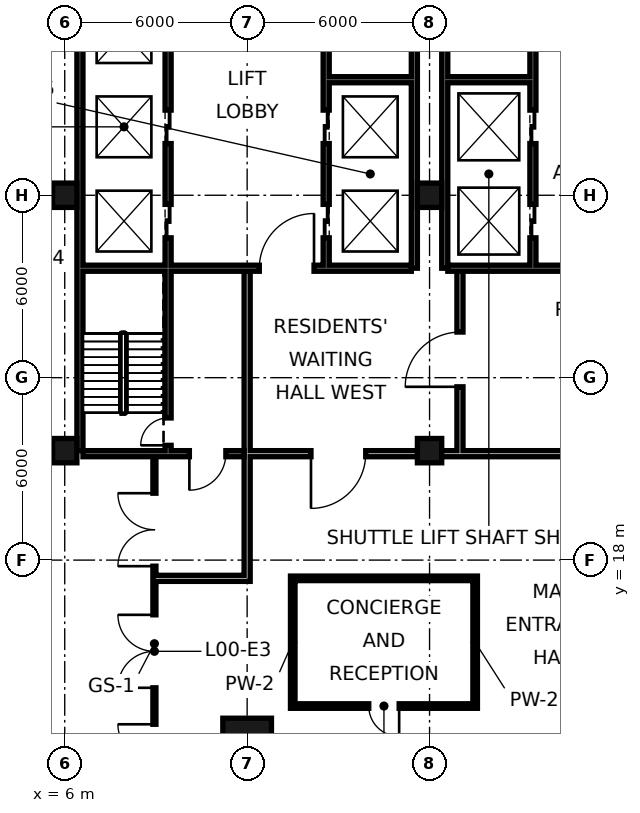
"""IFC4 building model, lengths in metres.
Left out: names, types, materials, properties, quantities, classifications, styles, units other than length and angle.
Written with IfcOpenShell. Run it as: python <this file> out.ifc"""

import sys

from ifc_helpers import new_model, si_unit, direction, frame, frame_2d, origin, origin_2d, place, context, subcontext, project, spatial, rectangle, hollow_rectangle, extrude, element, fill, save


model = new_model("IFC4")
c1 = context("Model", 3, precision=1e-05, world=origin(), true_north=direction((0.0, 1.0)))
c2 = subcontext(c1, "Body", "Model", "MODEL_VIEW")
j1 = project(units=[si_unit("LENGTHUNIT", "METRE"), si_unit("PLANEANGLEUNIT", "RADIAN")], contexts=[c1])
p1 = place(None, origin())
s1 = spatial("IfcSite", under=j1, at=p1, CompositionType="ELEMENT")
p2 = place(p1, origin())
s2 = spatial("IfcBuilding", under=s1, at=p2, CompositionType="ELEMENT")
p3 = place(p2, origin())
s3 = spatial("IfcBuildingStorey", under=s2, at=p3, CompositionType="ELEMENT", Elevation=0.0)
for number, where, z_axis, x_axis in (
    (1, (6.0, 21.6, 0.0), (0.0, 0.0, 1.0), (1.0, 0.0, 0.0)),
    (2, (6.0, 30.0, 0.0), (0.0, 0.0, 1.0), (1.0, 0.0, 0.0)),
):
    element("IfcColumn", number, at=place(p3, frame(where, z_axis=z_axis, x_axis=x_axis)), inside=s3, PredefinedType="COLUMN", context=c2, shape_type="SweptSolid", body=[
        extrude(hollow_rectangle(XDim=0.8, YDim=0.8, WallThickness=0.07, at=origin_2d()), origin(), (0.0, 0.0, 1.0), 15.0),
    ])
p4 = place(p3, frame((12.0, 12.0, 0.0), z_axis=(0.0, 0.0, 1.0), x_axis=(1.0, 0.0, 0.0)))
e3 = element("IfcColumn", 3, at=p4, inside=s3, PredefinedType="COLUMN", context=c2, shape_type="SweptSolid", body=[
    extrude(hollow_rectangle(XDim=1.6, YDim=1.6, WallThickness=0.07, at=origin_2d()), origin(), (0.0, 0.0, 1.0), 15.0),
])
for number, where, z_axis, x_axis in (
    (4, (18.0, 21.6, 0.0), (0.0, 0.0, 1.0), (1.0, 0.0, 0.0)),
    (5, (18.0, 30.0, 0.0), (0.0, 0.0, 1.0), (1.0, 0.0, 0.0)),
):
    element("IfcColumn", number, at=place(p3, frame(where, z_axis=z_axis, x_axis=x_axis)), inside=s3, PredefinedType="COLUMN", context=c2, shape_type="SweptSolid", body=[
        extrude(hollow_rectangle(XDim=0.8, YDim=0.8, WallThickness=0.07, at=origin_2d()), origin(), (0.0, 0.0, 1.0), 15.0),
    ])
p5 = place(p3, frame((8.95, 21.6, 0.0), z_axis=(0.0, 0.0, 1.0), x_axis=(0.0, -1.0, 0.0)))
e6 = element("IfcWall", 6, at=p5, inside=s3, PredefinedType="SOLIDWALL", context=c2, shape_type="SweptSolid", body=[
    extrude(rectangle(XDim=12.7, YDim=0.1, at=frame_2d((6.35, 0.0))), origin(), (0.0, 0.0, 1.0), 13.83),
])
p6 = place(p5, frame((9.0, 0.0, 0.0)))
e7 = element("IfcOpeningElement", 7, at=p6, cuts=e6, PredefinedType="OPENING", context=c2, shape_type="SweptSolid", body=[
    extrude(rectangle(XDim=2.4, YDim=2.6, at=frame_2d((1.2, 1.3))), frame((0.0, 0.06, 0.0), z_axis=(0.0, -1.0, 0.0), x_axis=(1.0, 0.0, 0.0)), (0.0, 0.0, 1.0), 0.12),
])
p7 = place(p5, frame((5.4, 0.0, 0.0)))
e8 = element("IfcOpeningElement", 8, at=p7, cuts=e6, PredefinedType="OPENING", context=c2, shape_type="SweptSolid", body=[
    extrude(rectangle(XDim=2.4, YDim=2.6, at=frame_2d((1.2, 1.3))), frame((0.0, 0.06, 0.0), z_axis=(0.0, -1.0, 0.0), x_axis=(1.0, 0.0, 0.0)), (0.0, 0.0, 1.0), 0.12),
])
p8 = place(p5, frame((1.4, 0.0, 0.0)))
e9 = element("IfcOpeningElement", 9, at=p8, cuts=e6, PredefinedType="OPENING", context=c2, shape_type="SweptSolid", body=[
    extrude(rectangle(XDim=2.4, YDim=2.6, at=frame_2d((1.2, 1.3))), frame((0.0, 0.06, 0.0), z_axis=(0.0, -1.0, 0.0), x_axis=(1.0, 0.0, 0.0)), (0.0, 0.0, 1.0), 0.12),
])
p9 = place(p3, frame((12.0, 17.3, 0.0), z_axis=(0.0, 0.0, 1.0), x_axis=(0.0, 1.0, 0.0)))
e10 = element("IfcWall", 10, at=p9, inside=s3, PredefinedType="SOLIDWALL", context=c2, shape_type="SweptSolid", body=[
    extrude(rectangle(XDim=4.2, YDim=0.2, at=frame_2d((2.1, 0.0))), origin(), (0.0, 0.0, 1.0), 13.85),
])
for number, where, z_axis, x_axis in (
    (11, (13.5, 13.125, 0.0), (0.0, 0.0, 1.0), (0.0, 1.0, 0.0)),
    (12, (19.5, 13.125, 0.0), (0.0, 0.0, 1.0), (0.0, 1.0, 0.0)),
):
    element("IfcWall", number, at=place(p3, frame(where, z_axis=z_axis, x_axis=x_axis)), inside=s3, PredefinedType="PARTITIONING", context=c2, shape_type="SweptSolid", body=[
        extrude(rectangle(XDim=4.35, YDim=0.15, at=frame_2d((2.175, 0.0))), origin(), (0.0, 0.0, 1.0), 14.55),
    ])
p10 = place(p3, frame((13.575, 13.2, 0.0), z_axis=(0.0, 0.0, 1.0), x_axis=(1.0, 0.0, 0.0)))
e13 = element("IfcWall", 13, at=p10, inside=s3, PredefinedType="PARTITIONING", context=c2, shape_type="SweptSolid", body=[
    extrude(rectangle(XDim=5.85, YDim=0.15, at=frame_2d((2.925, 0.0))), origin(), (0.0, 0.0, 1.0), 14.55),
])
p11 = place(p10, frame((2.425, 0.0, 0.0)))
e14 = element("IfcOpeningElement", 14, at=p11, cuts=e13, PredefinedType="OPENING", context=c2, shape_type="SweptSolid", body=[
    extrude(rectangle(XDim=1.0, YDim=2.4, at=frame_2d((0.5, 1.2))), frame((0.0, 0.085, 0.0), z_axis=(0.0, -1.0, 0.0), x_axis=(1.0, 0.0, 0.0)), (0.0, 0.0, 1.0), 0.17),
])
p12 = place(p3, frame((9.0, 17.4, 0.0), z_axis=(0.0, 0.0, 1.0), x_axis=(1.0, 0.0, 0.0)))
e15 = element("IfcWall", 15, at=p12, inside=s3, PredefinedType="SOLIDWALL", context=c2, shape_type="SweptSolid", body=[
    extrude(rectangle(XDim=2.9, YDim=0.2, at=frame_2d((1.45, 0.0))), origin(), (0.0, 0.0, 1.0), 14.55),
])
p13 = place(p3, frame((13.575, 17.4, 0.0), z_axis=(0.0, 0.0, 1.0), x_axis=(1.0, 0.0, 0.0)))
e16 = element("IfcWall", 16, at=p13, inside=s3, PredefinedType="PARTITIONING", context=c2, shape_type="SweptSolid", body=[
    extrude(rectangle(XDim=5.85, YDim=0.15, at=frame_2d((2.925, 0.0))), origin(), (0.0, 0.0, 1.0), 14.55),
])
p14 = place(p3, frame((6.5, 21.6, 0.0), z_axis=(0.0, 0.0, 1.0), x_axis=(0.0, 1.0, 0.0)))
e17 = element("IfcWall", 17, at=p14, inside=s3, PredefinedType="SOLIDWALL", context=c2, shape_type="SweptSolid", body=[
    extrude(rectangle(XDim=23.5, YDim=0.2, at=frame_2d((11.75, 0.0))), origin(), (0.0, 0.0, 1.0), 14.55),
])
for number, where, z_axis, x_axis in (
    (18, (17.5, 27.6, 0.0), (0.0, 0.0, 1.0), (0.0, 1.0, 0.0)),
    (19, (18.5, 27.6, 0.0), (0.0, 0.0, 1.0), (0.0, 1.0, 0.0)),
):
    element("IfcWall", number, at=place(p3, frame(where, z_axis=z_axis, x_axis=x_axis)), inside=s3, PredefinedType="SOLIDWALL", context=c2, shape_type="SweptSolid", body=[
        extrude(rectangle(XDim=17.5, YDim=0.2, at=frame_2d((8.75, 0.0))), origin(), (0.0, 0.0, 1.0), 14.55),
    ])
p15 = place(p3, frame((12.1, 21.5, 0.0), z_axis=(0.0, 0.0, 1.0), x_axis=(1.0, 0.0, 0.0)))
e20 = element("IfcWall", 20, at=p15, inside=s3, PredefinedType="SOLIDWALL", context=c2, shape_type="SweptSolid", body=[
    extrude(rectangle(XDim=23.8, YDim=0.2, at=frame_2d((11.9, 0.0))), origin(), (0.0, 0.0, 1.0), 13.85),
])
p16 = place(p15, frame((2.0, 0.0, 0.0)))
e21 = element("IfcOpeningElement", 21, at=p16, cuts=e20, PredefinedType="OPENING", context=c2, shape_type="SweptSolid", body=[
    extrude(rectangle(XDim=1.8, YDim=2.1, at=frame_2d((0.9, 1.05))), frame((0.0, 0.11, 0.0), z_axis=(0.0, -1.0, 0.0), x_axis=(1.0, 0.0, 0.0)), (0.0, 0.0, 1.0), 0.22),
])
p17 = place(p15, frame((11.0, 0.0, 0.0)))
e22 = element("IfcOpeningElement", 22, at=p17, cuts=e20, PredefinedType="OPENING", context=c2, shape_type="SweptSolid", body=[
    extrude(rectangle(XDim=1.8, YDim=2.1, at=frame_2d((0.9, 1.05))), frame((0.0, 0.11, 0.0), z_axis=(0.0, -1.0, 0.0), x_axis=(1.0, 0.0, 0.0)), (0.0, 0.0, 1.0), 0.22),
])
p18 = place(p15, frame((20.0, 0.0, 0.0)))
e23 = element("IfcOpeningElement", 23, at=p18, cuts=e20, PredefinedType="OPENING", context=c2, shape_type="SweptSolid", body=[
    extrude(rectangle(XDim=1.8, YDim=2.1, at=frame_2d((0.9, 1.05))), frame((0.0, 0.11, 0.0), z_axis=(0.0, -1.0, 0.0), x_axis=(1.0, 0.0, 0.0)), (0.0, 0.0, 1.0), 0.22),
])
p19 = place(p3, frame((19.0, 21.6, 0.0), z_axis=(0.0, 0.0, 1.0), x_axis=(0.0, 1.0, 0.0)))
e24 = element("IfcWall", 24, at=p19, inside=s3, PredefinedType="PARTITIONING", context=c2, shape_type="SweptSolid", body=[
    extrude(rectangle(XDim=6.0, YDim=0.2, at=frame_2d((3.0, 0.0))), origin(), (0.0, 0.0, 1.0), 13.85),
])
p20 = place(p19, frame((2.1, 0.0, 0.0)))
e25 = element("IfcOpeningElement", 25, at=p20, cuts=e24, PredefinedType="OPENING", context=c2, shape_type="SweptSolid", body=[
    extrude(rectangle(XDim=1.8, YDim=2.1, at=frame_2d((0.9, 1.05))), frame((0.0, 0.11, 0.0), z_axis=(0.0, -1.0, 0.0), x_axis=(1.0, 0.0, 0.0)), (0.0, 0.0, 1.0), 0.22),
])
p21 = place(p3, frame((12.0, 21.5, 0.0), z_axis=(0.0, 0.0, 1.0), x_axis=(0.0, 1.0, 0.0)))
e26 = element("IfcWall", 26, at=p21, inside=s3, PredefinedType="PARTITIONING", context=c2, shape_type="SweptSolid", body=[
    extrude(rectangle(XDim=6.0, YDim=0.2, at=frame_2d((3.0, 0.0))), origin(), (0.0, 0.0, 1.0), 13.85),
])
p22 = place(p3, frame((14.6, 27.7, 0.0), z_axis=(0.0, 0.0, 1.0), x_axis=(0.0, 1.0, 0.0)))
e27 = element("IfcWall", 27, at=p22, inside=s3, PredefinedType="SOLIDWALL", context=c2, shape_type="SweptSolid", body=[
    extrude(rectangle(XDim=17.3, YDim=0.2, at=frame_2d((8.65, 0.0))), origin(), (0.0, 0.0, 1.0), 14.55),
])
p23 = place(p22, frame((0.9, 0.0, 0.0)))
e28 = element("IfcOpeningElement", 28, at=p23, cuts=e27, PredefinedType="OPENING", context=c2, shape_type="SweptSolid", body=[
    extrude(rectangle(XDim=1.1, YDim=2.1, at=frame_2d((0.55, 1.05))), frame((0.0, 0.11, 0.0), z_axis=(0.0, -1.0, 0.0), x_axis=(1.0, 0.0, 0.0)), (0.0, 0.0, 1.0), 0.22),
])
p24 = place(p22, frame((4.0, 0.0, 0.0)))
e29 = element("IfcOpeningElement", 29, at=p24, cuts=e27, PredefinedType="OPENING", context=c2, shape_type="SweptSolid", body=[
    extrude(rectangle(XDim=1.1, YDim=2.1, at=frame_2d((0.55, 1.05))), frame((0.0, 0.11, 0.0), z_axis=(0.0, -1.0, 0.0), x_axis=(1.0, 0.0, 0.0)), (0.0, 0.0, 1.0), 0.22),
])
p25 = place(p22, frame((15.2, 0.0, 0.0)))
e30 = element("IfcOpeningElement", 30, at=p25, cuts=e27, PredefinedType="OPENING", context=c2, shape_type="SweptSolid", body=[
    extrude(rectangle(XDim=1.1, YDim=2.1, at=frame_2d((0.55, 1.05))), frame((0.0, 0.11, 0.0), z_axis=(0.0, -1.0, 0.0), x_axis=(1.0, 0.0, 0.0)), (0.0, 0.0, 1.0), 0.22),
])
p26 = place(p22, frame((9.7, 0.0, 0.0)))
e31 = element("IfcOpeningElement", 31, at=p26, cuts=e27, PredefinedType="OPENING", context=c2, shape_type="SweptSolid", body=[
    extrude(rectangle(XDim=0.9, YDim=2.1, at=frame_2d((0.45, 1.05))), frame((0.0, 0.11, 0.0), z_axis=(0.0, -1.0, 0.0), x_axis=(1.0, 0.0, 0.0)), (0.0, 0.0, 1.0), 0.22),
])
p27 = place(p3, frame((21.4, 27.7, 0.0), z_axis=(0.0, 0.0, 1.0), x_axis=(0.0, 1.0, 0.0)))
e32 = element("IfcWall", 32, at=p27, inside=s3, PredefinedType="SOLIDWALL", context=c2, shape_type="SweptSolid", body=[
    extrude(rectangle(XDim=17.3, YDim=0.2, at=frame_2d((8.65, 0.0))), origin(), (0.0, 0.0, 1.0), 14.55),
])
p28 = place(p27, frame((0.9, 0.0, 0.0)))
e33 = element("IfcOpeningElement", 33, at=p28, cuts=e32, PredefinedType="OPENING", context=c2, shape_type="SweptSolid", body=[
    extrude(rectangle(XDim=1.1, YDim=2.1, at=frame_2d((0.55, 1.05))), frame((0.0, 0.11, 0.0), z_axis=(0.0, -1.0, 0.0), x_axis=(1.0, 0.0, 0.0)), (0.0, 0.0, 1.0), 0.22),
])
p29 = place(p27, frame((4.0, 0.0, 0.0)))
e34 = element("IfcOpeningElement", 34, at=p29, cuts=e32, PredefinedType="OPENING", context=c2, shape_type="SweptSolid", body=[
    extrude(rectangle(XDim=1.1, YDim=2.1, at=frame_2d((0.55, 1.05))), frame((0.0, 0.11, 0.0), z_axis=(0.0, -1.0, 0.0), x_axis=(1.0, 0.0, 0.0)), (0.0, 0.0, 1.0), 0.22),
])
p30 = place(p27, frame((16.0, 0.0, 0.0)))
e35 = element("IfcOpeningElement", 35, at=p30, cuts=e32, PredefinedType="OPENING", context=c2, shape_type="SweptSolid", body=[
    extrude(rectangle(XDim=1.0, YDim=2.1, at=frame_2d((0.5, 1.05))), frame((0.0, 0.11, 0.0), z_axis=(0.0, -1.0, 0.0), x_axis=(1.0, 0.0, 0.0)), (0.0, 0.0, 1.0), 0.22),
])
p31 = place(p27, frame((7.2, 0.0, 0.0)))
e36 = element("IfcOpeningElement", 36, at=p31, cuts=e32, PredefinedType="OPENING", context=c2, shape_type="SweptSolid", body=[
    extrude(rectangle(XDim=0.9, YDim=2.1, at=frame_2d((0.45, 1.05))), frame((0.0, 0.11, 0.0), z_axis=(0.0, -1.0, 0.0), x_axis=(1.0, 0.0, 0.0)), (0.0, 0.0, 1.0), 0.22),
])
p32 = place(p3, frame((9.4, 21.5, 0.0), z_axis=(0.0, 0.0, 1.0), x_axis=(0.0, 1.0, 0.0)))
e37 = element("IfcWall", 37, at=p32, inside=s3, PredefinedType="SOLIDWALL", context=c2, shape_type="SweptSolid", body=[
    extrude(rectangle(XDim=23.5, YDim=0.2, at=frame_2d((11.75, 0.0))), origin(), (0.0, 0.0, 1.0), 13.85),
])
p33 = place(p32, frame((7.1, 0.0, 0.0)))
e38 = element("IfcOpeningElement", 38, at=p33, cuts=e37, PredefinedType="OPENING", context=c2, shape_type="SweptSolid", body=[
    extrude(rectangle(XDim=1.1, YDim=2.1, at=frame_2d((0.55, 1.05))), frame((0.0, 0.11, 0.0), z_axis=(0.0, -1.0, 0.0), x_axis=(1.0, 0.0, 0.0)), (0.0, 0.0, 1.0), 0.22),
])
p34 = place(p32, frame((10.2, 0.0, 0.0)))
e39 = element("IfcOpeningElement", 39, at=p34, cuts=e37, PredefinedType="OPENING", context=c2, shape_type="SweptSolid", body=[
    extrude(rectangle(XDim=1.1, YDim=2.1, at=frame_2d((0.55, 1.05))), frame((0.0, 0.11, 0.0), z_axis=(0.0, -1.0, 0.0), x_axis=(1.0, 0.0, 0.0)), (0.0, 0.0, 1.0), 0.22),
])
p35 = place(p32, frame((13.3, 0.0, 0.0)))
e40 = element("IfcOpeningElement", 40, at=p35, cuts=e37, PredefinedType="OPENING", context=c2, shape_type="SweptSolid", body=[
    extrude(rectangle(XDim=1.1, YDim=2.1, at=frame_2d((0.55, 1.05))), frame((0.0, 0.11, 0.0), z_axis=(0.0, -1.0, 0.0), x_axis=(1.0, 0.0, 0.0)), (0.0, 0.0, 1.0), 0.22),
])
p36 = place(p32, frame((22.2, 0.0, 0.0)))
e41 = element("IfcOpeningElement", 41, at=p36, cuts=e37, PredefinedType="OPENING", context=c2, shape_type="SweptSolid", body=[
    extrude(rectangle(XDim=1.0, YDim=2.1, at=frame_2d((0.5, 1.05))), frame((0.0, 0.11, 0.0), z_axis=(0.0, -1.0, 0.0), x_axis=(1.0, 0.0, 0.0)), (0.0, 0.0, 1.0), 0.22),
])
p37 = place(p32, frame((0.275, 0.0, 0.0)))
e42 = element("IfcOpeningElement", 42, at=p37, cuts=e37, PredefinedType="OPENING", context=c2, shape_type="SweptSolid", body=[
    extrude(rectangle(XDim=0.9, YDim=2.1, at=frame_2d((0.45, 1.05))), frame((0.0, 0.11, 0.0), z_axis=(0.0, -1.0, 0.0), x_axis=(1.0, 0.0, 0.0)), (0.0, 0.0, 1.0), 0.22),
])
p38 = place(p3, frame((6.6, 21.5, 0.0), z_axis=(0.0, 0.0, 1.0), x_axis=(1.0, 0.0, 0.0)))
e43 = element("IfcWall", 43, at=p38, inside=s3, PredefinedType="SOLIDWALL", context=c2, shape_type="SweptSolid", body=[
    extrude(rectangle(XDim=5.3, YDim=0.2, at=frame_2d((2.65, 0.0))), origin(), (0.0, 0.0, 1.0), 13.85),
])
p39 = place(p38, frame((3.5, 0.0, 0.0)))
e44 = element("IfcOpeningElement", 44, at=p39, cuts=e43, PredefinedType="OPENING", context=c2, shape_type="SweptSolid", body=[
    extrude(rectangle(XDim=1.2, YDim=2.1, at=frame_2d((0.6, 1.05))), frame((0.0, 0.11, 0.0), z_axis=(0.0, -1.0, 0.0), x_axis=(1.0, 0.0, 0.0)), (0.0, 0.0, 1.0), 0.22),
])
p40 = place(p3, frame((18.6, 27.6, 0.0), z_axis=(0.0, 0.0, 1.0), x_axis=(1.0, 0.0, 0.0)))
e45 = element("IfcWall", 45, at=p40, inside=s3, PredefinedType="SOLIDWALL", context=c2, shape_type="SweptSolid", body=[
    extrude(rectangle(XDim=10.8, YDim=0.2, at=frame_2d((5.4, 0.0))), origin(), (0.0, 0.0, 1.0), 14.55),
])
p41 = place(p40, frame((4.5, 0.0, 0.0)))
e46 = element("IfcOpeningElement", 46, at=p41, cuts=e45, PredefinedType="OPENING", context=c2, shape_type="SweptSolid", body=[
    extrude(rectangle(XDim=1.8, YDim=2.1, at=frame_2d((0.9, 1.05))), frame((0.0, 0.11, 0.0), z_axis=(0.0, -1.0, 0.0), x_axis=(1.0, 0.0, 0.0)), (0.0, 0.0, 1.0), 0.22),
])
p42 = place(p3, frame((6.6, 27.6, 0.0), z_axis=(0.0, 0.0, 1.0), x_axis=(1.0, 0.0, 0.0)))
e47 = element("IfcWall", 47, at=p42, inside=s3, PredefinedType="SOLIDWALL", context=c2, shape_type="SweptSolid", body=[
    extrude(rectangle(XDim=10.8, YDim=0.2, at=frame_2d((5.4, 0.0))), origin(), (0.0, 0.0, 1.0), 14.55),
])
p43 = place(p42, frame((5.8, 0.0, 0.0)))
e48 = element("IfcOpeningElement", 48, at=p43, cuts=e47, PredefinedType="OPENING", context=c2, shape_type="SweptSolid", body=[
    extrude(rectangle(XDim=1.8, YDim=2.1, at=frame_2d((0.9, 1.05))), frame((0.0, 0.11, 0.0), z_axis=(0.0, -1.0, 0.0), x_axis=(1.0, 0.0, 0.0)), (0.0, 0.0, 1.0), 0.22),
])
for number, where, z_axis, x_axis in (
    (49, (14.7, 33.8, 0.0), (0.0, 0.0, 1.0), (1.0, 0.0, 0.0)),
    (50, (18.6, 33.8, 0.0), (0.0, 0.0, 1.0), (1.0, 0.0, 0.0)),
):
    element("IfcWall", number, at=place(p3, frame(where, z_axis=z_axis, x_axis=x_axis)), inside=s3, PredefinedType="SOLIDWALL", context=c2, shape_type="SweptSolid", body=[
        extrude(rectangle(XDim=2.7, YDim=0.2, at=frame_2d((1.35, 0.0))), origin(), (0.0, 0.0, 1.0), 14.55),
    ])
p44 = place(p6, frame((2.4, 0.0, 0.0), z_axis=(0.0, 0.0, 1.0), x_axis=(-1.0, 0.0, 0.0)))
e51 = element("IfcDoor", 51, at=p44, inside=s3, OperationType="DOUBLE_DOOR_SINGLE_SWING", PredefinedType="DOOR", context=c2, shape_type="SweptSolid", body=[
    extrude(rectangle(XDim=2.4, YDim=2.6, at=frame_2d((1.2, 1.3))), frame((0.0, 0.025, 0.0), z_axis=(0.0, -1.0, 0.0), x_axis=(1.0, 0.0, 0.0)), (0.0, 0.0, 1.0), 0.05),
])
fill(e7, e51)
p45 = place(p7, frame((2.4, 0.0, 0.0), z_axis=(0.0, 0.0, 1.0), x_axis=(-1.0, 0.0, 0.0)))
e52 = element("IfcDoor", 52, at=p45, inside=s3, OperationType="DOUBLE_DOOR_SINGLE_SWING", PredefinedType="DOOR", context=c2, shape_type="SweptSolid", body=[
    extrude(rectangle(XDim=2.4, YDim=2.6, at=frame_2d((1.2, 1.3))), frame((0.0, 0.025, 0.0), z_axis=(0.0, -1.0, 0.0), x_axis=(1.0, 0.0, 0.0)), (0.0, 0.0, 1.0), 0.05),
])
fill(e8, e52)
p46 = place(p8, frame((2.4, 0.0, 0.0), z_axis=(0.0, 0.0, 1.0), x_axis=(-1.0, 0.0, 0.0)))
e53 = element("IfcDoor", 53, at=p46, inside=s3, OperationType="DOUBLE_DOOR_SINGLE_SWING", PredefinedType="DOOR", context=c2, shape_type="SweptSolid", body=[
    extrude(rectangle(XDim=2.4, YDim=2.6, at=frame_2d((1.2, 1.3))), frame((0.0, 0.025, 0.0), z_axis=(0.0, -1.0, 0.0), x_axis=(1.0, 0.0, 0.0)), (0.0, 0.0, 1.0), 0.05),
])
fill(e9, e53)
p47 = place(p11, origin())
e54 = element("IfcDoor", 54, at=p47, inside=s3, OperationType="SINGLE_SWING_RIGHT", PredefinedType="DOOR", context=c2, shape_type="SweptSolid", body=[
    extrude(rectangle(XDim=1.0, YDim=2.4, at=frame_2d((0.5, 1.2))), frame((0.0, 0.025, 0.0), z_axis=(0.0, -1.0, 0.0), x_axis=(1.0, 0.0, 0.0)), (0.0, 0.0, 1.0), 0.05),
])
fill(e14, e54)
p48 = place(p16, frame((1.8, 0.0, 0.0), z_axis=(0.0, 0.0, 1.0), x_axis=(-1.0, 0.0, 0.0)))
e55 = element("IfcDoor", 55, at=p48, inside=s3, OperationType="SINGLE_SWING_RIGHT", PredefinedType="DOOR", context=c2, shape_type="SweptSolid", body=[
    extrude(rectangle(XDim=1.8, YDim=2.1, at=frame_2d((0.9, 1.05))), frame((0.0, 0.025, 0.0), z_axis=(0.0, -1.0, 0.0), x_axis=(1.0, 0.0, 0.0)), (0.0, 0.0, 1.0), 0.05),
])
fill(e21, e55)
p49 = place(p20, origin())
e56 = element("IfcDoor", 56, at=p49, inside=s3, OperationType="SINGLE_SWING_LEFT", PredefinedType="DOOR", context=c2, shape_type="SweptSolid", body=[
    extrude(rectangle(XDim=1.8, YDim=2.1, at=frame_2d((0.9, 1.05))), frame((0.0, 0.025, 0.0), z_axis=(0.0, -1.0, 0.0), x_axis=(1.0, 0.0, 0.0)), (0.0, 0.0, 1.0), 0.05),
])
fill(e25, e56)
p50 = place(p39, frame((1.2, 0.0, 0.0), z_axis=(0.0, 0.0, 1.0), x_axis=(-1.0, 0.0, 0.0)))
e57 = element("IfcDoor", 57, at=p50, inside=s3, OperationType="SINGLE_SWING_RIGHT", PredefinedType="DOOR", context=c2, shape_type="SweptSolid", body=[
    extrude(rectangle(XDim=1.2, YDim=2.1, at=frame_2d((0.6, 1.05))), frame((0.0, 0.025, 0.0), z_axis=(0.0, -1.0, 0.0), x_axis=(1.0, 0.0, 0.0)), (0.0, 0.0, 1.0), 0.05),
])
fill(e44, e57)
p51 = place(p43, frame((1.8, 0.0, 0.0), z_axis=(0.0, 0.0, 1.0), x_axis=(-1.0, 0.0, 0.0)))
e58 = element("IfcDoor", 58, at=p51, inside=s3, OperationType="SINGLE_SWING_LEFT", PredefinedType="DOOR", context=c2, shape_type="SweptSolid", body=[
    extrude(rectangle(XDim=1.8, YDim=2.1, at=frame_2d((0.9, 1.05))), frame((0.0, 0.025, 0.0), z_axis=(0.0, -1.0, 0.0), x_axis=(1.0, 0.0, 0.0)), (0.0, 0.0, 1.0), 0.05),
])
fill(e48, e58)
p52 = place(p28, origin())
e59 = element("IfcDoor", 59, at=p52, inside=s3, OperationType="DOUBLE_DOOR_SLIDING", PredefinedType="DOOR", context=c2, shape_type="SweptSolid", body=[
    extrude(rectangle(XDim=1.1, YDim=2.1, at=frame_2d((0.55, 1.05))), frame((0.0, 0.025, 0.0), z_axis=(0.0, -1.0, 0.0), x_axis=(1.0, 0.0, 0.0)), (0.0, 0.0, 1.0), 0.05),
])
fill(e33, e59)
p53 = place(p29, origin())
e60 = element("IfcDoor", 60, at=p53, inside=s3, OperationType="DOUBLE_DOOR_SLIDING", PredefinedType="DOOR", context=c2, shape_type="SweptSolid", body=[
    extrude(rectangle(XDim=1.1, YDim=2.1, at=frame_2d((0.55, 1.05))), frame((0.0, 0.025, 0.0), z_axis=(0.0, -1.0, 0.0), x_axis=(1.0, 0.0, 0.0)), (0.0, 0.0, 1.0), 0.05),
])
fill(e34, e60)
p54 = place(p23, origin())
e61 = element("IfcDoor", 61, at=p54, inside=s3, OperationType="DOUBLE_DOOR_SLIDING", PredefinedType="DOOR", context=c2, shape_type="SweptSolid", body=[
    extrude(rectangle(XDim=1.1, YDim=2.1, at=frame_2d((0.55, 1.05))), frame((0.0, 0.025, 0.0), z_axis=(0.0, -1.0, 0.0), x_axis=(1.0, 0.0, 0.0)), (0.0, 0.0, 1.0), 0.05),
])
fill(e28, e61)
p55 = place(p24, origin())
e62 = element("IfcDoor", 62, at=p55, inside=s3, OperationType="DOUBLE_DOOR_SLIDING", PredefinedType="DOOR", context=c2, shape_type="SweptSolid", body=[
    extrude(rectangle(XDim=1.1, YDim=2.1, at=frame_2d((0.55, 1.05))), frame((0.0, 0.025, 0.0), z_axis=(0.0, -1.0, 0.0), x_axis=(1.0, 0.0, 0.0)), (0.0, 0.0, 1.0), 0.05),
])
fill(e29, e62)
p56 = place(p33, origin())
e63 = element("IfcDoor", 63, at=p56, inside=s3, OperationType="DOUBLE_DOOR_SLIDING", PredefinedType="DOOR", context=c2, shape_type="SweptSolid", body=[
    extrude(rectangle(XDim=1.1, YDim=2.1, at=frame_2d((0.55, 1.05))), frame((0.0, 0.025, 0.0), z_axis=(0.0, -1.0, 0.0), x_axis=(1.0, 0.0, 0.0)), (0.0, 0.0, 1.0), 0.05),
])
fill(e38, e63)
p57 = place(p34, origin())
e64 = element("IfcDoor", 64, at=p57, inside=s3, OperationType="DOUBLE_DOOR_SLIDING", PredefinedType="DOOR", context=c2, shape_type="SweptSolid", body=[
    extrude(rectangle(XDim=1.1, YDim=2.1, at=frame_2d((0.55, 1.05))), frame((0.0, 0.025, 0.0), z_axis=(0.0, -1.0, 0.0), x_axis=(1.0, 0.0, 0.0)), (0.0, 0.0, 1.0), 0.05),
])
fill(e39, e64)
p58 = place(p37, origin())
e65 = element("IfcDoor", 65, at=p58, inside=s3, OperationType="SINGLE_SWING_LEFT", PredefinedType="DOOR", context=c2, shape_type="SweptSolid", body=[
    extrude(rectangle(XDim=0.9, YDim=2.1, at=frame_2d((0.45, 1.05))), frame((0.0, 0.025, 0.0), z_axis=(0.0, -1.0, 0.0), x_axis=(1.0, 0.0, 0.0)), (0.0, 0.0, 1.0), 0.05),
])
fill(e42, e65)
save(model, sys.argv[1])
